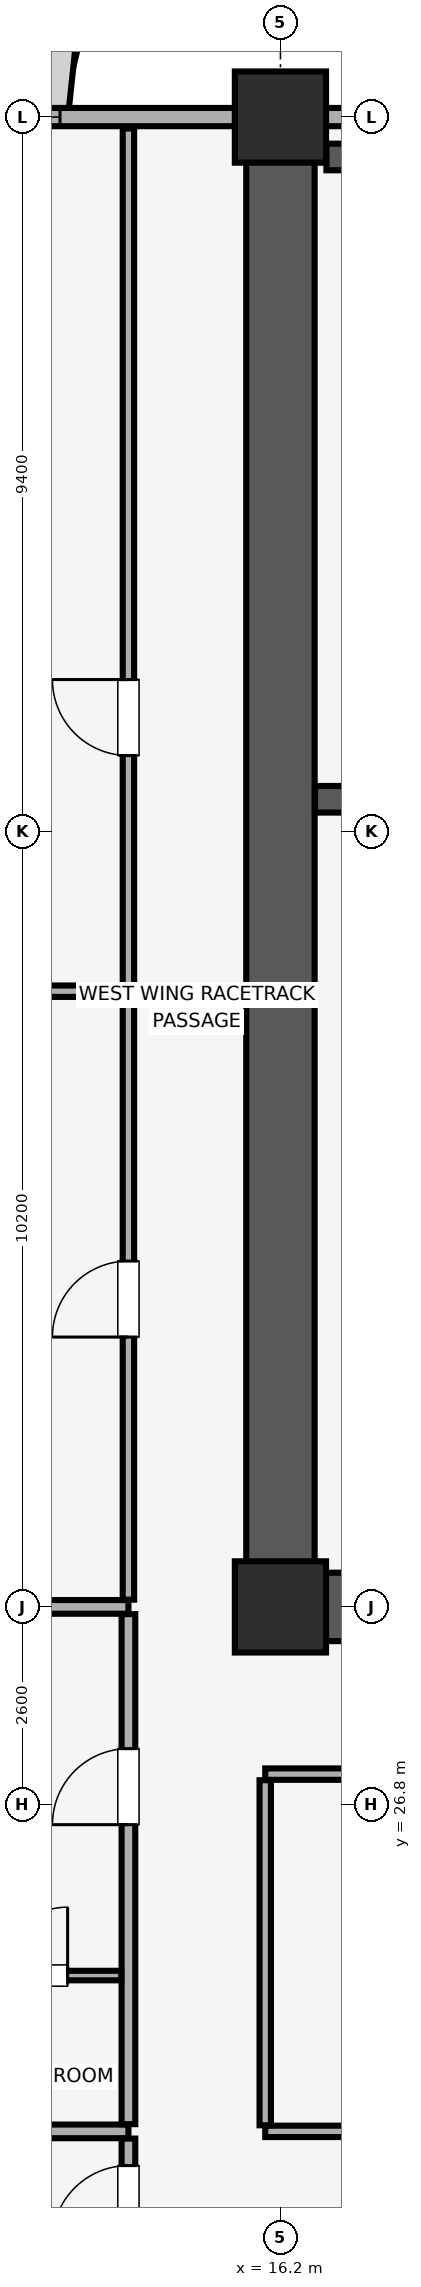
"""IFC4 building model, lengths in metres.
Left out: names, types, materials, properties, quantities, classifications, styles, units other than length and angle.
Written with IfcOpenShell. Run it as: python <this file> out.ifc"""

import sys

from ifc_helpers import new_model, si_unit, direction, frame, frame_2d, origin, origin_2d, place, context, subcontext, project, spatial, rectangle, extrude, element, fill, save


model = new_model("IFC4")
c1 = context("Model", 3, precision=1e-05, world=origin(), true_north=direction((0.0, 1.0)))
c2 = subcontext(c1, "Body", "Model", "MODEL_VIEW")
j1 = project(units=[si_unit("LENGTHUNIT", "METRE"), si_unit("PLANEANGLEUNIT", "RADIAN")], contexts=[c1])
p1 = place(None, origin())
s1 = spatial("IfcSite", under=j1, at=p1, CompositionType="ELEMENT")
p2 = place(p1, origin())
s2 = spatial("IfcBuilding", under=s1, at=p2, CompositionType="ELEMENT")
p3 = place(p2, frame((0.0, 0.0, 180.95)))
s3 = spatial("IfcBuildingStorey", under=s2, at=p3, CompositionType="ELEMENT", Elevation=180.95)
for number, where, z_axis, x_axis in (
    (1, (16.2, 29.4, 0.0), (0.0, 0.0, 1.0), (1.0, 0.0, 0.0)),
    (2, (16.2, 49.0, 0.0), (0.0, 0.0, 1.0), (1.0, 0.0, 0.0)),
):
    element("IfcColumn", number, at=place(p3, frame(where, z_axis=z_axis, x_axis=x_axis)), inside=s3, PredefinedType="COLUMN", context=c2, shape_type="SweptSolid", body=[
        extrude(rectangle(XDim=1.2, YDim=1.2, at=origin_2d()), origin(), (0.0, 0.0, 1.0), 3.45),
    ])
p4 = place(p3, frame((77.0, 49.0, 0.0), z_axis=(0.0, 0.0, 1.0), x_axis=(-1.0, 0.0, 0.0)))
e3 = element("IfcWall", 3, at=p4, inside=s3, PredefinedType="SOLIDWALL", context=c2, shape_type="SweptSolid", body=[
    extrude(rectangle(XDim=70.0, YDim=0.24, at=frame_2d((35.0, 0.0))), origin(), (0.0, 0.0, 1.0), 2.65),
])
p5 = place(p4, frame((63.7, 0.0, 0.85)))
e4 = element("IfcOpeningElement", 4, at=p5, cuts=e3, PredefinedType="OPENING", context=c2, shape_type="SweptSolid", body=[
    extrude(rectangle(XDim=3.0, YDim=1.5, at=frame_2d((1.5, 0.75))), frame((0.0, 0.13, 0.0), z_axis=(0.0, -1.0, 0.0), x_axis=(1.0, 0.0, 0.0)), (0.0, 0.0, 1.0), 0.26),
])
p6 = place(p4, frame((3.3, 0.0, 0.85)))
e5 = element("IfcOpeningElement", 5, at=p6, cuts=e3, PredefinedType="OPENING", context=c2, shape_type="SweptSolid", body=[
    extrude(rectangle(XDim=3.0, YDim=1.5, at=frame_2d((1.5, 0.75))), frame((0.0, 0.13, 0.0), z_axis=(0.0, -1.0, 0.0), x_axis=(1.0, 0.0, 0.0)), (0.0, 0.0, 1.0), 0.26),
])
p7 = place(p4, frame((49.465, 0.0, 0.9)))
e6 = element("IfcOpeningElement", 6, at=p7, cuts=e3, PredefinedType="OPENING", context=c2, shape_type="SweptSolid", body=[
    extrude(rectangle(XDim=1.5, YDim=1.4, at=frame_2d((0.75, 0.7))), frame((0.0, 0.13, 0.0), z_axis=(0.0, -1.0, 0.0), x_axis=(1.0, 0.0, 0.0)), (0.0, 0.0, 1.0), 0.26),
])
p8 = place(p4, frame((41.65, 0.0, 0.9)))
e7 = element("IfcOpeningElement", 7, at=p8, cuts=e3, PredefinedType="OPENING", context=c2, shape_type="SweptSolid", body=[
    extrude(rectangle(XDim=3.6, YDim=1.5, at=frame_2d((1.8, 0.75))), frame((0.0, 0.13, 0.0), z_axis=(0.0, -1.0, 0.0), x_axis=(1.0, 0.0, 0.0)), (0.0, 0.0, 1.0), 0.26),
])
p9 = place(p4, frame((28.25, 0.0, 0.9)))
e8 = element("IfcOpeningElement", 8, at=p9, cuts=e3, PredefinedType="OPENING", context=c2, shape_type="SweptSolid", body=[
    extrude(rectangle(XDim=1.5, YDim=1.4, at=frame_2d((0.75, 0.7))), frame((0.0, 0.13, 0.0), z_axis=(0.0, -1.0, 0.0), x_axis=(1.0, 0.0, 0.0)), (0.0, 0.0, 1.0), 0.26),
])
p10 = place(p4, frame((24.6, 0.0, 0.9)))
e9 = element("IfcOpeningElement", 9, at=p10, cuts=e3, PredefinedType="OPENING", context=c2, shape_type="SweptSolid", body=[
    extrude(rectangle(XDim=2.4, YDim=1.5, at=frame_2d((1.2, 0.75))), frame((0.0, 0.13, 0.0), z_axis=(0.0, -1.0, 0.0), x_axis=(1.0, 0.0, 0.0)), (0.0, 0.0, 1.0), 0.26),
])
p11 = place(p4, frame((20.235, 0.0, 0.9)))
e10 = element("IfcOpeningElement", 10, at=p11, cuts=e3, PredefinedType="OPENING", context=c2, shape_type="SweptSolid", body=[
    extrude(rectangle(XDim=2.4, YDim=1.5, at=frame_2d((1.2, 0.75))), frame((0.0, 0.13, 0.0), z_axis=(0.0, -1.0, 0.0), x_axis=(1.0, 0.0, 0.0)), (0.0, 0.0, 1.0), 0.26),
])
p12 = place(p3, frame((16.2, 29.4, 0.0), z_axis=(0.0, 0.0, 1.0), x_axis=(0.0, 1.0, 0.0)))
e11 = element("IfcWall", 11, at=p12, inside=s3, PredefinedType="SHEAR", context=c2, shape_type="SweptSolid", body=[
    extrude(rectangle(XDim=19.2, YDim=0.9, at=frame_2d((9.6, 0.0))), origin(), (0.0, 0.0, 1.0), 3.45),
])
p13 = place(p3, frame((16.655, 29.4, 0.0), z_axis=(0.0, 0.0, 1.0), x_axis=(1.0, 0.0, 0.0)))
e12 = element("IfcWall", 12, at=p13, inside=s3, PredefinedType="SHEAR", context=c2, shape_type="SweptSolid", body=[
    extrude(rectangle(XDim=6.945, YDim=0.9, at=frame_2d((3.473, 0.0))), origin(), (0.0, 0.0, 1.0), 3.45),
])
p14 = place(p3, frame((16.655, 40.025, 0.0), z_axis=(0.0, 0.0, 1.0), x_axis=(1.0, 0.0, 0.0)))
e13 = element("IfcWall", 13, at=p14, inside=s3, PredefinedType="SHEAR", context=c2, shape_type="SweptSolid", body=[
    extrude(rectangle(XDim=4.2, YDim=0.35, at=frame_2d((2.1, 0.0))), origin(), (0.0, 0.0, 1.0), 3.45),
])
p15 = place(p14, frame((1.81, 0.0, 0.0)))
e14 = element("IfcOpeningElement", 14, at=p15, cuts=e13, PredefinedType="OPENING", context=c2, shape_type="SweptSolid", body=[
    extrude(rectangle(XDim=1.15, YDim=2.15, at=frame_2d((0.575, 1.075))), frame((0.0, 0.185, 0.0), z_axis=(0.0, -1.0, 0.0), x_axis=(1.0, 0.0, 0.0)), (0.0, 0.0, 1.0), 0.37),
])
p16 = place(p3, frame((16.805, 48.475, 0.0), z_axis=(0.0, 0.0, 1.0), x_axis=(1.0, 0.0, 0.0)))
e15 = element("IfcWall", 15, at=p16, inside=s3, PredefinedType="SHEAR", context=c2, shape_type="SweptSolid", body=[
    extrude(rectangle(XDim=4.05, YDim=0.35, at=frame_2d((2.025, 0.0))), origin(), (0.0, 0.0, 1.0), 3.45),
])
p17 = place(p3, frame((3.15, 22.5, 0.0), z_axis=(0.0, 0.0, 1.0), x_axis=(1.0, 0.0, 0.0)))
e16 = element("IfcWall", 16, at=p17, inside=s3, PredefinedType="PARTITIONING", context=c2, shape_type="SweptSolid", body=[
    extrude(rectangle(XDim=11.05, YDim=0.18, at=frame_2d((5.525, 0.0))), origin(), (0.0, 0.0, 1.0), 3.45),
])
p18 = place(p3, frame((14.2, 20.695, 0.0), z_axis=(0.0, 0.0, 1.0), x_axis=(0.0, 1.0, 0.0)))
e17 = element("IfcWall", 17, at=p18, inside=s3, PredefinedType="PARTITIONING", context=c2, shape_type="SweptSolid", body=[
    extrude(rectangle(XDim=1.71, YDim=0.18, at=frame_2d((0.855, 0.0))), origin(), (0.0, 0.0, 1.0), 3.45),
])
p19 = place(p18, frame((0.355, 0.0, 0.0)))
e18 = element("IfcOpeningElement", 18, at=p19, cuts=e17, PredefinedType="OPENING", context=c2, shape_type="SweptSolid", body=[
    extrude(rectangle(XDim=1.0, YDim=2.15, at=frame_2d((0.5, 1.075))), frame((0.0, 0.1, 0.0), z_axis=(0.0, -1.0, 0.0), x_axis=(1.0, 0.0, 0.0)), (0.0, 0.0, 1.0), 0.2),
])
p20 = place(p3, frame((3.15, 29.4, 0.0), z_axis=(0.0, 0.0, 1.0), x_axis=(1.0, 0.0, 0.0)))
e19 = element("IfcWall", 19, at=p20, inside=s3, PredefinedType="PARTITIONING", context=c2, shape_type="SweptSolid", body=[
    extrude(rectangle(XDim=11.05, YDim=0.18, at=frame_2d((5.525, 0.0))), origin(), (0.0, 0.0, 1.0), 2.54),
])
p21 = place(p3, frame((14.2, 22.595, 0.0), z_axis=(0.0, 0.0, 1.0), x_axis=(0.0, 1.0, 0.0)))
e20 = element("IfcWall", 20, at=p21, inside=s3, PredefinedType="PARTITIONING", context=c2, shape_type="SweptSolid", body=[
    extrude(rectangle(XDim=6.71, YDim=0.18, at=frame_2d((3.355, 0.0))), origin(), (0.0, 0.0, 1.0), 3.45),
])
p22 = place(p21, frame((3.94, 0.0, 0.0)))
e21 = element("IfcOpeningElement", 21, at=p22, cuts=e20, PredefinedType="OPENING", context=c2, shape_type="SweptSolid", body=[
    extrude(rectangle(XDim=1.0, YDim=2.15, at=frame_2d((0.5, 1.075))), frame((0.0, 0.1, 0.0), z_axis=(0.0, -1.0, 0.0), x_axis=(1.0, 0.0, 0.0)), (0.0, 0.0, 1.0), 0.2),
])
p23 = place(p3, frame((11.7, 24.55, 0.0), z_axis=(0.0, 0.0, 1.0), x_axis=(1.0, 0.0, 0.0)))
e22 = element("IfcWall", 22, at=p23, inside=s3, PredefinedType="PARTITIONING", context=c2, shape_type="SweptSolid", body=[
    extrude(rectangle(XDim=2.405, YDim=0.125, at=frame_2d((1.203, 0.0))), origin(), (0.0, 0.0, 1.0), 3.45),
])
p24 = place(p23, frame((0.8, 0.0, 0.0)))
e23 = element("IfcOpeningElement", 23, at=p24, cuts=e22, PredefinedType="OPENING", context=c2, shape_type="SweptSolid", body=[
    extrude(rectangle(XDim=0.9, YDim=2.1, at=frame_2d((0.45, 1.05))), frame((0.0, 0.073, 0.0), z_axis=(0.0, -1.0, 0.0), x_axis=(1.0, 0.0, 0.0)), (0.0, 0.0, 1.0), 0.145),
])
p25 = place(p3, frame((16.0, 22.5, 0.0), z_axis=(0.0, 0.0, 1.0), x_axis=(1.0, 0.0, 0.0)))
e24 = element("IfcWall", 24, at=p25, inside=s3, PredefinedType="PARTITIONING", context=c2, shape_type="SweptSolid", body=[
    extrude(rectangle(XDim=9.0, YDim=0.15, at=frame_2d((4.5, 0.0))), origin(), (0.0, 0.0, 1.0), 3.45),
])
p26 = place(p3, frame((16.0, 27.2, 0.0), z_axis=(0.0, 0.0, 1.0), x_axis=(1.0, 0.0, 0.0)))
e25 = element("IfcWall", 25, at=p26, inside=s3, PredefinedType="PARTITIONING", context=c2, shape_type="SweptSolid", body=[
    extrude(rectangle(XDim=9.0, YDim=0.15, at=frame_2d((4.5, 0.0))), origin(), (0.0, 0.0, 1.0), 3.45),
])
p27 = place(p26, frame((4.0, 0.0, 0.0)))
e26 = element("IfcOpeningElement", 26, at=p27, cuts=e25, PredefinedType="OPENING", context=c2, shape_type="SweptSolid", body=[
    extrude(rectangle(XDim=1.0, YDim=2.15, at=frame_2d((0.5, 1.075))), frame((0.0, 0.085, 0.0), z_axis=(0.0, -1.0, 0.0), x_axis=(1.0, 0.0, 0.0)), (0.0, 0.0, 1.0), 0.17),
])
p28 = place(p3, frame((16.0, 22.58, 0.0), z_axis=(0.0, 0.0, 1.0), x_axis=(0.0, 1.0, 0.0)))
e27 = element("IfcWall", 27, at=p28, inside=s3, PredefinedType="PARTITIONING", context=c2, shape_type="SweptSolid", body=[
    extrude(rectangle(XDim=4.54, YDim=0.15, at=frame_2d((2.27, 0.0))), origin(), (0.0, 0.0, 1.0), 2.95),
])
p29 = place(p3, frame((3.15, 37.5, 0.0), z_axis=(0.0, 0.0, 1.0), x_axis=(1.0, 0.0, 0.0)))
e28 = element("IfcWall", 28, at=p29, inside=s3, PredefinedType="PARTITIONING", context=c2, shape_type="SweptSolid", body=[
    extrude(rectangle(XDim=11.05, YDim=0.15, at=frame_2d((5.525, 0.0))), origin(), (0.0, 0.0, 1.0), 3.45),
])
p30 = place(p3, frame((14.2, 29.495, 0.0), z_axis=(0.0, 0.0, 1.0), x_axis=(0.0, 1.0, 0.0)))
e29 = element("IfcWall", 29, at=p30, inside=s3, PredefinedType="PARTITIONING", context=c2, shape_type="SweptSolid", body=[
    extrude(rectangle(XDim=7.925, YDim=0.15, at=frame_2d((3.962, 0.0))), origin(), (0.0, 0.0, 1.0), 3.45),
])
p31 = place(p30, frame((3.455, 0.0, 0.0)))
e30 = element("IfcOpeningElement", 30, at=p31, cuts=e29, PredefinedType="OPENING", context=c2, shape_type="SweptSolid", body=[
    extrude(rectangle(XDim=1.0, YDim=2.15, at=frame_2d((0.5, 1.075))), frame((0.0, 0.085, 0.0), z_axis=(0.0, -1.0, 0.0), x_axis=(1.0, 0.0, 0.0)), (0.0, 0.0, 1.0), 0.17),
])
p32 = place(p3, frame((14.2, 37.58, 0.0), z_axis=(0.0, 0.0, 1.0), x_axis=(0.0, 1.0, 0.0)))
e31 = element("IfcWall", 31, at=p32, inside=s3, PredefinedType="PARTITIONING", context=c2, shape_type="SweptSolid", body=[
    extrude(rectangle(XDim=11.27, YDim=0.15, at=frame_2d((5.635, 0.0))), origin(), (0.0, 0.0, 1.0), 3.45),
])
p33 = place(p32, frame((3.02, 0.0, 0.0)))
e32 = element("IfcOpeningElement", 32, at=p33, cuts=e31, PredefinedType="OPENING", context=c2, shape_type="SweptSolid", body=[
    extrude(rectangle(XDim=1.0, YDim=2.15, at=frame_2d((0.5, 1.075))), frame((0.0, 0.085, 0.0), z_axis=(0.0, -1.0, 0.0), x_axis=(1.0, 0.0, 0.0)), (0.0, 0.0, 1.0), 0.17),
])
p34 = place(p5, origin())
e33 = element("IfcWindow", 33, at=p34, inside=s3, PartitioningType="SINGLE_PANEL", PredefinedType="WINDOW", context=c2, shape_type="SweptSolid", body=[
    extrude(rectangle(XDim=3.0, YDim=1.5, at=frame_2d((1.5, 0.75))), frame((0.0, 0.03, 0.0), z_axis=(0.0, -1.0, 0.0), x_axis=(1.0, 0.0, 0.0)), (0.0, 0.0, 1.0), 0.06),
])
fill(e4, e33)
p35 = place(p19, origin())
e34 = element("IfcDoor", 34, at=p35, inside=s3, OperationType="SINGLE_SWING_LEFT", PredefinedType="DOOR", context=c2, shape_type="SweptSolid", body=[
    extrude(rectangle(XDim=1.0, YDim=2.15, at=frame_2d((0.5, 1.075))), frame((0.0, 0.025, 0.0), z_axis=(0.0, -1.0, 0.0), x_axis=(1.0, 0.0, 0.0)), (0.0, 0.0, 1.0), 0.05),
])
fill(e18, e34)
p36 = place(p22, origin())
e35 = element("IfcDoor", 35, at=p36, inside=s3, OperationType="SINGLE_SWING_LEFT", PredefinedType="DOOR", context=c2, shape_type="SweptSolid", body=[
    extrude(rectangle(XDim=1.0, YDim=2.15, at=frame_2d((0.5, 1.075))), frame((0.0, 0.025, 0.0), z_axis=(0.0, -1.0, 0.0), x_axis=(1.0, 0.0, 0.0)), (0.0, 0.0, 1.0), 0.05),
])
fill(e21, e35)
p37 = place(p24, origin())
e36 = element("IfcDoor", 36, at=p37, inside=s3, OperationType="SINGLE_SWING_RIGHT", PredefinedType="DOOR", context=c2, shape_type="SweptSolid", body=[
    extrude(rectangle(XDim=0.9, YDim=2.1, at=frame_2d((0.45, 1.05))), frame((0.0, 0.025, 0.0), z_axis=(0.0, -1.0, 0.0), x_axis=(1.0, 0.0, 0.0)), (0.0, 0.0, 1.0), 0.05),
])
fill(e23, e36)
p38 = place(p31, origin())
e37 = element("IfcDoor", 37, at=p38, inside=s3, OperationType="SINGLE_SWING_LEFT", PredefinedType="DOOR", context=c2, shape_type="SweptSolid", body=[
    extrude(rectangle(XDim=1.0, YDim=2.15, at=frame_2d((0.5, 1.075))), frame((0.0, 0.025, 0.0), z_axis=(0.0, -1.0, 0.0), x_axis=(1.0, 0.0, 0.0)), (0.0, 0.0, 1.0), 0.05),
])
fill(e30, e37)
p39 = place(p33, origin())
e38 = element("IfcDoor", 38, at=p39, inside=s3, OperationType="SINGLE_SWING_RIGHT", PredefinedType="DOOR", context=c2, shape_type="SweptSolid", body=[
    extrude(rectangle(XDim=1.0, YDim=2.15, at=frame_2d((0.5, 1.075))), frame((0.0, 0.025, 0.0), z_axis=(0.0, -1.0, 0.0), x_axis=(1.0, 0.0, 0.0)), (0.0, 0.0, 1.0), 0.05),
])
fill(e32, e38)
save(model, sys.argv[1])
